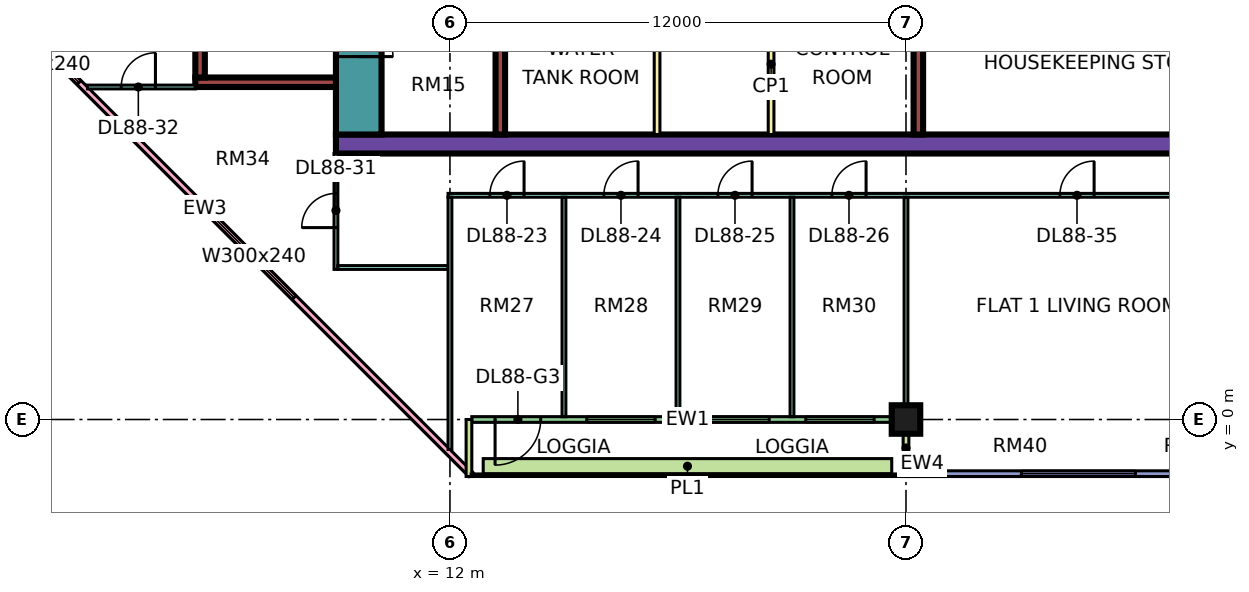
"""IFC4 building model, lengths in metres.
Left out: names, types, materials, properties, quantities, classifications, styles, units other than length and angle.
Written with IfcOpenShell. Run it as: python <this file> out.ifc"""

import sys

from ifc_helpers import new_model, si_unit, direction, frame, frame_2d, origin, origin_2d, place, context, subcontext, project, spatial, rectangle, extrude, element, fill, save


model = new_model("IFC4")
c1 = context("Model", 3, precision=1e-05, world=origin(), true_north=direction((0.0, 1.0)))
c2 = subcontext(c1, "Body", "Model", "MODEL_VIEW")
j1 = project(units=[si_unit("LENGTHUNIT", "METRE"), si_unit("PLANEANGLEUNIT", "RADIAN")], contexts=[c1])
p1 = place(None, origin())
s1 = spatial("IfcSite", under=j1, at=p1, CompositionType="ELEMENT")
p2 = place(p1, origin())
s2 = spatial("IfcBuilding", under=s1, at=p2, CompositionType="ELEMENT")
p3 = place(p2, frame((0.0, 0.0, 376.4)))
s3 = spatial("IfcBuildingStorey", under=s2, at=p3, CompositionType="ELEMENT", Elevation=376.4)
p4 = place(p3, frame((24.0, 0.0, 0.0), z_axis=(0.0, 0.0, 1.0), x_axis=(1.0, 0.0, 0.0)))
e1 = element("IfcColumn", 1, at=p4, inside=s3, PredefinedType="COLUMN", context=c2, shape_type="SweptSolid", body=[
    extrude(rectangle(XDim=0.75, YDim=0.75, at=origin_2d()), origin(), (0.0, 0.0, 1.0), 3.75),
])
p5 = place(p3, frame((9.0, 7.25, 0.0), z_axis=(0.0, 0.0, 1.0), x_axis=(1.0, 0.0, 0.0)))
e2 = element("IfcWall", 2, at=p5, inside=s3, PredefinedType="SHEAR", context=c2, shape_type="SweptSolid", body=[
    extrude(rectangle(XDim=25.0, YDim=0.5, at=frame_2d((12.5, 0.0))), origin(), (0.0, 0.0, 1.0), 3.75),
])
p6 = place(p3, frame((9.6, 7.5, 0.0), z_axis=(0.0, 0.0, 1.0), x_axis=(0.0, 1.0, 0.0)))
e3 = element("IfcWall", 3, at=p6, inside=s3, PredefinedType="SHEAR", context=c2, shape_type="SweptSolid", body=[
    extrude(rectangle(XDim=12.0, YDim=1.2, at=frame_2d((6.0, 0.0))), origin(), (0.0, 0.0, 1.0), 3.75),
])
p7 = place(p6, frame((4.375, 0.0, 0.0)))
e4 = element("IfcOpeningElement", 4, at=p7, cuts=e3, PredefinedType="OPENING", context=c2, shape_type="SweptSolid", body=[
    extrude(rectangle(XDim=1.1, YDim=2.2, at=frame_2d((0.55, 1.1))), frame((0.0, 0.61, 0.0), z_axis=(0.0, -1.0, 0.0), x_axis=(1.0, 0.0, 0.0)), (0.0, 0.0, 1.0), 1.22),
])
p8 = place(p6, frame((6.875, 0.0, 0.0)))
e5 = element("IfcOpeningElement", 5, at=p8, cuts=e3, PredefinedType="OPENING", context=c2, shape_type="SweptSolid", body=[
    extrude(rectangle(XDim=1.1, YDim=2.2, at=frame_2d((0.55, 1.1))), frame((0.0, 0.61, 0.0), z_axis=(0.0, -1.0, 0.0), x_axis=(1.0, 0.0, 0.0)), (0.0, 0.0, 1.0), 1.22),
])
p9 = place(p6, frame((9.85, 0.0, 0.0)))
e6 = element("IfcOpeningElement", 6, at=p9, cuts=e3, PredefinedType="OPENING", context=c2, shape_type="SweptSolid", body=[
    extrude(rectangle(XDim=1.1, YDim=2.2, at=frame_2d((0.55, 1.1))), frame((0.0, 0.61, 0.0), z_axis=(0.0, -1.0, 0.0), x_axis=(1.0, 0.0, 0.0)), (0.0, 0.0, 1.0), 1.22),
])
p10 = place(p6, frame((2.05, 0.0, 0.0)))
e7 = element("IfcOpeningElement", 7, at=p10, cuts=e3, PredefinedType="OPENING", context=c2, shape_type="SweptSolid", body=[
    extrude(rectangle(XDim=0.9, YDim=2.1, at=frame_2d((0.45, 1.05))), frame((0.0, 0.61, 0.0), z_axis=(0.0, -1.0, 0.0), x_axis=(1.0, 0.0, 0.0)), (0.0, 0.0, 1.0), 1.22),
])
p11 = place(p3, frame((13.325, 7.5, 0.0), z_axis=(0.0, 0.0, 1.0), x_axis=(0.0, 1.0, 0.0)))
e8 = element("IfcWall", 8, at=p11, inside=s3, PredefinedType="SHEAR", context=c2, shape_type="SweptSolid", body=[
    extrude(rectangle(XDim=12.0, YDim=0.25, at=frame_2d((6.0, 0.0))), origin(), (0.0, 0.0, 1.0), 3.75),
])
for number, where, z_axis, x_axis in (
    (9, (24.325, 7.5, 0.0), (0.0, 0.0, 1.0), (0.0, 1.0, 0.0)),
    (10, (5.3, 8.875, 0.0), (0.0, 0.0, 1.0), (1.0, 0.0, 0.0)),
):
    element("IfcWall", number, at=place(p3, frame(where, z_axis=z_axis, x_axis=x_axis)), inside=s3, PredefinedType="SHEAR", context=c2, shape_type="SweptSolid", body=[
        extrude(rectangle(XDim=3.7, YDim=0.25, at=frame_2d((1.85, 0.0))), origin(), (0.0, 0.0, 1.0), 3.75),
    ])
p12 = place(p3, frame((5.425, 9.0, 0.0), z_axis=(0.0, 0.0, 1.0), x_axis=(0.0, 1.0, 0.0)))
e11 = element("IfcWall", 11, at=p12, inside=s3, PredefinedType="SHEAR", context=c2, shape_type="SweptSolid", body=[
    extrude(rectangle(XDim=4.0, YDim=0.25, at=frame_2d((2.0, 0.0))), origin(), (0.0, 0.0, 1.0), 3.75),
])
p13 = place(p3, frame((-1.447, 12.553, 0.0), z_axis=(0.0, 0.0, 1.0), x_axis=(0.707106781187, -0.707106781187, 0.0)))
e12 = element("IfcWall", 12, at=p13, inside=s3, PredefinedType="SOLIDWALL", context=c2, shape_type="SweptSolid", body=[
    extrude(rectangle(XDim=19.799, YDim=0.15, at=frame_2d((9.899, 0.0))), origin(), (0.0, 0.0, 1.0), 3.35),
])
p14 = place(p13, frame((2.212, 0.0, 0.45)))
e13 = element("IfcOpeningElement", 13, at=p14, cuts=e12, PredefinedType="OPENING", context=c2, shape_type="SweptSolid", body=[
    extrude(rectangle(XDim=3.0, YDim=2.4, at=frame_2d((1.5, 1.2))), frame((0.0, 0.085, 0.0), z_axis=(0.0, -1.0, 0.0), x_axis=(1.0, 0.0, 0.0)), (0.0, 0.0, 1.0), 0.17),
])
p15 = place(p13, frame((10.216, 0.0, 0.45)))
e14 = element("IfcOpeningElement", 14, at=p15, cuts=e12, PredefinedType="OPENING", context=c2, shape_type="SweptSolid", body=[
    extrude(rectangle(XDim=3.0, YDim=2.4, at=frame_2d((1.5, 1.2))), frame((0.0, 0.085, 0.0), z_axis=(0.0, -1.0, 0.0), x_axis=(1.0, 0.0, 0.0)), (0.0, 0.0, 1.0), 0.17),
])
p16 = place(p3, frame((12.575, 0.0, 0.0), z_axis=(0.0, 0.0, 1.0), x_axis=(1.0, 0.0, 0.0)))
e15 = element("IfcWall", 15, at=p16, inside=s3, PredefinedType="SOLIDWALL", context=c2, shape_type="SweptSolid", body=[
    extrude(rectangle(XDim=11.35, YDim=0.15, at=frame_2d((5.675, 0.0))), origin(), (0.0, 0.0, 1.0), 3.35),
])
p17 = place(p16, frame((0.613, 0.0, 0.0)))
e16 = element("IfcOpeningElement", 16, at=p17, cuts=e15, PredefinedType="OPENING", context=c2, shape_type="SweptSolid", body=[
    extrude(rectangle(XDim=1.2, YDim=2.4, at=frame_2d((0.6, 1.2))), frame((0.0, 0.085, 0.0), z_axis=(0.0, -1.0, 0.0), x_axis=(1.0, 0.0, 0.0)), (0.0, 0.0, 1.0), 0.17),
])
p18 = place(p16, frame((3.025, 0.0, 0.45)))
e17 = element("IfcOpeningElement", 17, at=p18, cuts=e15, PredefinedType="OPENING", context=c2, shape_type="SweptSolid", body=[
    extrude(rectangle(XDim=1.8, YDim=2.4, at=frame_2d((0.9, 1.2))), frame((0.0, 0.085, 0.0), z_axis=(0.0, -1.0, 0.0), x_axis=(1.0, 0.0, 0.0)), (0.0, 0.0, 1.0), 0.17),
])
p19 = place(p16, frame((6.025, 0.0, 0.45)))
e18 = element("IfcOpeningElement", 18, at=p19, cuts=e15, PredefinedType="OPENING", context=c2, shape_type="SweptSolid", body=[
    extrude(rectangle(XDim=1.8, YDim=2.4, at=frame_2d((0.9, 1.2))), frame((0.0, 0.085, 0.0), z_axis=(0.0, -1.0, 0.0), x_axis=(1.0, 0.0, 0.0)), (0.0, 0.0, 1.0), 0.17),
])
p20 = place(p16, frame((8.788, 0.0, 0.45)))
e19 = element("IfcOpeningElement", 19, at=p20, cuts=e15, PredefinedType="OPENING", context=c2, shape_type="SweptSolid", body=[
    extrude(rectangle(XDim=1.8, YDim=2.4, at=frame_2d((0.9, 1.2))), frame((0.0, 0.085, 0.0), z_axis=(0.0, -1.0, 0.0), x_axis=(1.0, 0.0, 0.0)), (0.0, 0.0, 1.0), 0.17),
])
for number, where, z_axis, x_axis in (
    (20, (12.5, -1.5, 0.0), (0.0, 0.0, 1.0), (0.0, 1.0, 0.0)),
    (21, (24.0, -1.5, 0.0), (0.0, 0.0, 1.0), (0.0, 1.0, 0.0)),
):
    element("IfcWall", number, at=place(p3, frame(where, z_axis=z_axis, x_axis=x_axis)), inside=s3, PredefinedType="SOLIDWALL", context=c2, shape_type="SweptSolid", body=[
        extrude(rectangle(XDim=1.5, YDim=0.15, at=frame_2d((0.75, 0.0))), origin(), (0.0, 0.0, 1.0), 3.35),
    ])
p21 = place(p3, frame((24.075, -1.425, 0.0), z_axis=(0.0, 0.0, 1.0), x_axis=(1.0, 0.0, 0.0)))
e22 = element("IfcWall", 22, at=p21, inside=s3, PredefinedType="SOLIDWALL", context=c2, shape_type="SweptSolid", body=[
    extrude(rectangle(XDim=11.85, YDim=0.15, at=frame_2d((5.925, 0.0))), origin(), (0.0, 0.0, 1.0), 3.35),
])
p22 = place(p21, frame((2.962, 0.0, 0.45)))
e23 = element("IfcOpeningElement", 23, at=p22, cuts=e22, PredefinedType="OPENING", context=c2, shape_type="SweptSolid", body=[
    extrude(rectangle(XDim=3.0, YDim=2.4, at=frame_2d((1.5, 1.2))), frame((0.0, 0.085, 0.0), z_axis=(0.0, -1.0, 0.0), x_axis=(1.0, 0.0, 0.0)), (0.0, 0.0, 1.0), 0.17),
])
p23 = place(p21, frame((9.488, 0.0, 0.45)))
e24 = element("IfcOpeningElement", 24, at=p23, cuts=e22, PredefinedType="OPENING", context=c2, shape_type="SweptSolid", body=[
    extrude(rectangle(XDim=1.8, YDim=2.4, at=frame_2d((0.9, 1.2))), frame((0.0, 0.085, 0.0), z_axis=(0.0, -1.0, 0.0), x_axis=(1.0, 0.0, 0.0)), (0.0, 0.0, 1.0), 0.17),
])
p24 = place(p3, frame((12.875, -1.229, 0.0), z_axis=(0.0, 0.0, 1.0), x_axis=(1.0, 0.0, 0.0)))
e25 = element("IfcWall", 25, at=p24, inside=s3, PredefinedType="SOLIDWALL", context=c2, shape_type="SweptSolid", body=[
    extrude(rectangle(XDim=10.75, YDim=0.4, at=frame_2d((5.375, 0.0))), origin(), (0.0, 0.0, 1.0), 0.7),
])
for number, where, z_axis, x_axis in (
    (26, (17.45, 7.5, 0.0), (0.0, 0.0, 1.0), (0.0, 1.0, 0.0)),
    (27, (20.45, 7.5, 0.0), (0.0, 0.0, 1.0), (0.0, 1.0, 0.0)),
):
    element("IfcWall", number, at=place(p3, frame(where, z_axis=z_axis, x_axis=x_axis)), inside=s3, PredefinedType="PARTITIONING", context=c2, shape_type="SweptSolid", body=[
        extrude(rectangle(XDim=3.7, YDim=0.15, at=frame_2d((1.85, 0.0))), origin(), (0.0, 0.0, 1.0), 3.35),
    ])
p25 = place(p3, frame((2.461, 8.75, 0.0), z_axis=(0.0, 0.0, 1.0), x_axis=(1.0, 0.0, 0.0)))
e28 = element("IfcWall", 28, at=p25, inside=s3, PredefinedType="PARTITIONING", context=c2, shape_type="SweptSolid", body=[
    extrude(rectangle(XDim=2.839, YDim=0.1, at=frame_2d((1.419, 0.0))), origin(), (0.0, 0.0, 1.0), 3.35),
])
p26 = place(p25, frame((0.889, 0.0, 0.0)))
e29 = element("IfcOpeningElement", 29, at=p26, cuts=e28, PredefinedType="OPENING", context=c2, shape_type="SweptSolid", body=[
    extrude(rectangle(XDim=0.9, YDim=2.1, at=frame_2d((0.45, 1.05))), frame((0.0, 0.06, 0.0), z_axis=(0.0, -1.0, 0.0), x_axis=(1.0, 0.0, 0.0)), (0.0, 0.0, 1.0), 0.12),
])
p27 = place(p3, frame((9.0, 3.95, 0.0), z_axis=(0.0, 0.0, 1.0), x_axis=(0.0, 1.0, 0.0)))
e30 = element("IfcWall", 30, at=p27, inside=s3, PredefinedType="PARTITIONING", context=c2, shape_type="SweptSolid", body=[
    extrude(rectangle(XDim=3.05, YDim=0.1, at=frame_2d((1.525, 0.0))), origin(), (0.0, 0.0, 1.0), 3.35),
])
p28 = place(p27, frame((1.1, 0.0, 0.0)))
e31 = element("IfcOpeningElement", 31, at=p28, cuts=e30, PredefinedType="OPENING", context=c2, shape_type="SweptSolid", body=[
    extrude(rectangle(XDim=0.9, YDim=2.1, at=frame_2d((0.45, 1.05))), frame((0.0, 0.06, 0.0), z_axis=(0.0, -1.0, 0.0), x_axis=(1.0, 0.0, 0.0)), (0.0, 0.0, 1.0), 0.12),
])
p29 = place(p3, frame((9.05, 4.0, 0.0), z_axis=(0.0, 0.0, 1.0), x_axis=(1.0, 0.0, 0.0)))
e32 = element("IfcWall", 32, at=p29, inside=s3, PredefinedType="PARTITIONING", context=c2, shape_type="SweptSolid", body=[
    extrude(rectangle(XDim=2.9, YDim=0.1, at=frame_2d((1.45, 0.0))), origin(), (0.0, 0.0, 1.0), 3.35),
])
p30 = place(p3, frame((11.95, 5.9, 0.0), z_axis=(0.0, 0.0, 1.0), x_axis=(1.0, 0.0, 0.0)))
e33 = element("IfcWall", 33, at=p30, inside=s3, PredefinedType="PARTITIONING", context=c2, shape_type="SweptSolid", body=[
    extrude(rectangle(XDim=21.1, YDim=0.1, at=frame_2d((10.55, 0.0))), origin(), (0.0, 0.0, 1.0), 3.35),
])
p31 = place(p30, frame((1.1, 0.0, 0.0)))
e34 = element("IfcOpeningElement", 34, at=p31, cuts=e33, PredefinedType="OPENING", context=c2, shape_type="SweptSolid", body=[
    extrude(rectangle(XDim=0.9, YDim=2.1, at=frame_2d((0.45, 1.05))), frame((0.0, 0.06, 0.0), z_axis=(0.0, -1.0, 0.0), x_axis=(1.0, 0.0, 0.0)), (0.0, 0.0, 1.0), 0.12),
])
p32 = place(p30, frame((4.1, 0.0, 0.0)))
e35 = element("IfcOpeningElement", 35, at=p32, cuts=e33, PredefinedType="OPENING", context=c2, shape_type="SweptSolid", body=[
    extrude(rectangle(XDim=0.9, YDim=2.1, at=frame_2d((0.45, 1.05))), frame((0.0, 0.06, 0.0), z_axis=(0.0, -1.0, 0.0), x_axis=(1.0, 0.0, 0.0)), (0.0, 0.0, 1.0), 0.12),
])
p33 = place(p30, frame((7.1, 0.0, 0.0)))
e36 = element("IfcOpeningElement", 36, at=p33, cuts=e33, PredefinedType="OPENING", context=c2, shape_type="SweptSolid", body=[
    extrude(rectangle(XDim=0.9, YDim=2.1, at=frame_2d((0.45, 1.05))), frame((0.0, 0.06, 0.0), z_axis=(0.0, -1.0, 0.0), x_axis=(1.0, 0.0, 0.0)), (0.0, 0.0, 1.0), 0.12),
])
p34 = place(p30, frame((10.1, 0.0, 0.0)))
e37 = element("IfcOpeningElement", 37, at=p34, cuts=e33, PredefinedType="OPENING", context=c2, shape_type="SweptSolid", body=[
    extrude(rectangle(XDim=0.9, YDim=2.1, at=frame_2d((0.45, 1.05))), frame((0.0, 0.06, 0.0), z_axis=(0.0, -1.0, 0.0), x_axis=(1.0, 0.0, 0.0)), (0.0, 0.0, 1.0), 0.12),
])
p35 = place(p30, frame((16.1, 0.0, 0.0)))
e38 = element("IfcOpeningElement", 38, at=p35, cuts=e33, PredefinedType="OPENING", context=c2, shape_type="SweptSolid", body=[
    extrude(rectangle(XDim=0.9, YDim=2.1, at=frame_2d((0.45, 1.05))), frame((0.0, 0.06, 0.0), z_axis=(0.0, -1.0, 0.0), x_axis=(1.0, 0.0, 0.0)), (0.0, 0.0, 1.0), 0.12),
])
p36 = place(p3, frame((12.0, -0.788, 0.0), z_axis=(0.0, 0.0, 1.0), x_axis=(0.0, 1.0, 0.0)))
e39 = element("IfcWall", 39, at=p36, inside=s3, PredefinedType="PARTITIONING", context=c2, shape_type="SweptSolid", body=[
    extrude(rectangle(XDim=6.638, YDim=0.1, at=frame_2d((3.319, 0.0))), origin(), (0.0, 0.0, 1.0), 3.35),
])
for number, where, z_axis, x_axis in (
    (40, (15.0, 0.074, 0.0), (0.0, 0.0, 1.0), (0.0, 1.0, 0.0)),
    (41, (18.0, 0.074, 0.0), (0.0, 0.0, 1.0), (0.0, 1.0, 0.0)),
    (42, (21.0, 0.074, 0.0), (0.0, 0.0, 1.0), (0.0, 1.0, 0.0)),
):
    element("IfcWall", number, at=place(p3, frame(where, z_axis=z_axis, x_axis=x_axis)), inside=s3, PredefinedType="PARTITIONING", context=c2, shape_type="SweptSolid", body=[
        extrude(rectangle(XDim=5.776, YDim=0.1, at=frame_2d((2.888, 0.0))), origin(), (0.0, 0.0, 1.0), 3.35),
    ])
p37 = place(p3, frame((24.0, 0.0, 0.0), z_axis=(0.0, 0.0, 1.0), x_axis=(0.0, 1.0, 0.0)))
e43 = element("IfcWall", 43, at=p37, inside=s3, PredefinedType="PARTITIONING", context=c2, shape_type="SweptSolid", body=[
    extrude(rectangle(XDim=5.85, YDim=0.1, at=frame_2d((2.925, 0.0))), origin(), (0.0, 0.0, 1.0), 3.35),
])
p38 = place(p14, origin())
e44 = element("IfcWindow", 44, at=p38, inside=s3, PartitioningType="SINGLE_PANEL", PredefinedType="WINDOW", context=c2, shape_type="SweptSolid", body=[
    extrude(rectangle(XDim=3.0, YDim=2.4, at=frame_2d((1.5, 1.2))), frame((0.0, 0.03, 0.0), z_axis=(0.0, -1.0, 0.0), x_axis=(1.0, 0.0, 0.0)), (0.0, 0.0, 1.0), 0.06),
])
fill(e13, e44)
p39 = place(p15, origin())
e45 = element("IfcWindow", 45, at=p39, inside=s3, PartitioningType="SINGLE_PANEL", PredefinedType="WINDOW", context=c2, shape_type="SweptSolid", body=[
    extrude(rectangle(XDim=3.0, YDim=2.4, at=frame_2d((1.5, 1.2))), frame((0.0, 0.03, 0.0), z_axis=(0.0, -1.0, 0.0), x_axis=(1.0, 0.0, 0.0)), (0.0, 0.0, 1.0), 0.06),
])
fill(e14, e45)
p40 = place(p17, frame((1.2, 0.0, 0.0), z_axis=(0.0, 0.0, 1.0), x_axis=(-1.0, 0.0, 0.0)))
e46 = element("IfcDoor", 46, at=p40, inside=s3, OperationType="DOUBLE_DOOR_SINGLE_SWING", PredefinedType="DOOR", context=c2, shape_type="SweptSolid", body=[
    extrude(rectangle(XDim=1.2, YDim=2.4, at=frame_2d((0.6, 1.2))), frame((0.0, 0.025, 0.0), z_axis=(0.0, -1.0, 0.0), x_axis=(1.0, 0.0, 0.0)), (0.0, 0.0, 1.0), 0.05),
])
fill(e16, e46)
p41 = place(p18, origin())
e47 = element("IfcWindow", 47, at=p41, inside=s3, PartitioningType="SINGLE_PANEL", PredefinedType="WINDOW", context=c2, shape_type="SweptSolid", body=[
    extrude(rectangle(XDim=1.8, YDim=2.4, at=frame_2d((0.9, 1.2))), frame((0.0, 0.03, 0.0), z_axis=(0.0, -1.0, 0.0), x_axis=(1.0, 0.0, 0.0)), (0.0, 0.0, 1.0), 0.06),
])
fill(e17, e47)
p42 = place(p19, origin())
e48 = element("IfcWindow", 48, at=p42, inside=s3, PartitioningType="SINGLE_PANEL", PredefinedType="WINDOW", context=c2, shape_type="SweptSolid", body=[
    extrude(rectangle(XDim=1.8, YDim=2.4, at=frame_2d((0.9, 1.2))), frame((0.0, 0.03, 0.0), z_axis=(0.0, -1.0, 0.0), x_axis=(1.0, 0.0, 0.0)), (0.0, 0.0, 1.0), 0.06),
])
fill(e18, e48)
p43 = place(p20, origin())
e49 = element("IfcWindow", 49, at=p43, inside=s3, PartitioningType="SINGLE_PANEL", PredefinedType="WINDOW", context=c2, shape_type="SweptSolid", body=[
    extrude(rectangle(XDim=1.8, YDim=2.4, at=frame_2d((0.9, 1.2))), frame((0.0, 0.03, 0.0), z_axis=(0.0, -1.0, 0.0), x_axis=(1.0, 0.0, 0.0)), (0.0, 0.0, 1.0), 0.06),
])
fill(e19, e49)
p44 = place(p22, origin())
e50 = element("IfcWindow", 50, at=p44, inside=s3, PartitioningType="SINGLE_PANEL", PredefinedType="WINDOW", context=c2, shape_type="SweptSolid", body=[
    extrude(rectangle(XDim=3.0, YDim=2.4, at=frame_2d((1.5, 1.2))), frame((0.0, 0.03, 0.0), z_axis=(0.0, -1.0, 0.0), x_axis=(1.0, 0.0, 0.0)), (0.0, 0.0, 1.0), 0.06),
])
fill(e23, e50)
p45 = place(p10, frame((0.9, 0.0, 0.0), z_axis=(0.0, 0.0, 1.0), x_axis=(-1.0, 0.0, 0.0)))
e51 = element("IfcDoor", 51, at=p45, inside=s3, OperationType="SINGLE_SWING_LEFT", PredefinedType="DOOR", context=c2, shape_type="SweptSolid", body=[
    extrude(rectangle(XDim=0.9, YDim=2.1, at=frame_2d((0.45, 1.05))), frame((0.0, 0.025, 0.0), z_axis=(0.0, -1.0, 0.0), x_axis=(1.0, 0.0, 0.0)), (0.0, 0.0, 1.0), 0.05),
])
fill(e7, e51)
p46 = place(p31, frame((0.9, 0.0, 0.0), z_axis=(0.0, 0.0, 1.0), x_axis=(-1.0, 0.0, 0.0)))
e52 = element("IfcDoor", 52, at=p46, inside=s3, OperationType="SINGLE_SWING_RIGHT", PredefinedType="DOOR", context=c2, shape_type="SweptSolid", body=[
    extrude(rectangle(XDim=0.9, YDim=2.1, at=frame_2d((0.45, 1.05))), frame((0.0, 0.025, 0.0), z_axis=(0.0, -1.0, 0.0), x_axis=(1.0, 0.0, 0.0)), (0.0, 0.0, 1.0), 0.05),
])
fill(e34, e52)
p47 = place(p32, frame((0.9, 0.0, 0.0), z_axis=(0.0, 0.0, 1.0), x_axis=(-1.0, 0.0, 0.0)))
e53 = element("IfcDoor", 53, at=p47, inside=s3, OperationType="SINGLE_SWING_RIGHT", PredefinedType="DOOR", context=c2, shape_type="SweptSolid", body=[
    extrude(rectangle(XDim=0.9, YDim=2.1, at=frame_2d((0.45, 1.05))), frame((0.0, 0.025, 0.0), z_axis=(0.0, -1.0, 0.0), x_axis=(1.0, 0.0, 0.0)), (0.0, 0.0, 1.0), 0.05),
])
fill(e35, e53)
p48 = place(p33, frame((0.9, 0.0, 0.0), z_axis=(0.0, 0.0, 1.0), x_axis=(-1.0, 0.0, 0.0)))
e54 = element("IfcDoor", 54, at=p48, inside=s3, OperationType="SINGLE_SWING_RIGHT", PredefinedType="DOOR", context=c2, shape_type="SweptSolid", body=[
    extrude(rectangle(XDim=0.9, YDim=2.1, at=frame_2d((0.45, 1.05))), frame((0.0, 0.025, 0.0), z_axis=(0.0, -1.0, 0.0), x_axis=(1.0, 0.0, 0.0)), (0.0, 0.0, 1.0), 0.05),
])
fill(e36, e54)
p49 = place(p34, frame((0.9, 0.0, 0.0), z_axis=(0.0, 0.0, 1.0), x_axis=(-1.0, 0.0, 0.0)))
e55 = element("IfcDoor", 55, at=p49, inside=s3, OperationType="SINGLE_SWING_RIGHT", PredefinedType="DOOR", context=c2, shape_type="SweptSolid", body=[
    extrude(rectangle(XDim=0.9, YDim=2.1, at=frame_2d((0.45, 1.05))), frame((0.0, 0.025, 0.0), z_axis=(0.0, -1.0, 0.0), x_axis=(1.0, 0.0, 0.0)), (0.0, 0.0, 1.0), 0.05),
])
fill(e37, e55)
p50 = place(p28, origin())
e56 = element("IfcDoor", 56, at=p50, inside=s3, OperationType="SINGLE_SWING_LEFT", PredefinedType="DOOR", context=c2, shape_type="SweptSolid", body=[
    extrude(rectangle(XDim=0.9, YDim=2.1, at=frame_2d((0.45, 1.05))), frame((0.0, 0.025, 0.0), z_axis=(0.0, -1.0, 0.0), x_axis=(1.0, 0.0, 0.0)), (0.0, 0.0, 1.0), 0.05),
])
fill(e31, e56)
p51 = place(p26, frame((0.9, 0.0, 0.0), z_axis=(0.0, 0.0, 1.0), x_axis=(-1.0, 0.0, 0.0)))
e57 = element("IfcDoor", 57, at=p51, inside=s3, OperationType="SINGLE_SWING_RIGHT", PredefinedType="DOOR", context=c2, shape_type="SweptSolid", body=[
    extrude(rectangle(XDim=0.9, YDim=2.1, at=frame_2d((0.45, 1.05))), frame((0.0, 0.025, 0.0), z_axis=(0.0, -1.0, 0.0), x_axis=(1.0, 0.0, 0.0)), (0.0, 0.0, 1.0), 0.05),
])
fill(e29, e57)
p52 = place(p35, frame((0.9, 0.0, 0.0), z_axis=(0.0, 0.0, 1.0), x_axis=(-1.0, 0.0, 0.0)))
e58 = element("IfcDoor", 58, at=p52, inside=s3, OperationType="SINGLE_SWING_RIGHT", PredefinedType="DOOR", context=c2, shape_type="SweptSolid", body=[
    extrude(rectangle(XDim=0.9, YDim=2.1, at=frame_2d((0.45, 1.05))), frame((0.0, 0.025, 0.0), z_axis=(0.0, -1.0, 0.0), x_axis=(1.0, 0.0, 0.0)), (0.0, 0.0, 1.0), 0.05),
])
fill(e38, e58)
save(model, sys.argv[1])
